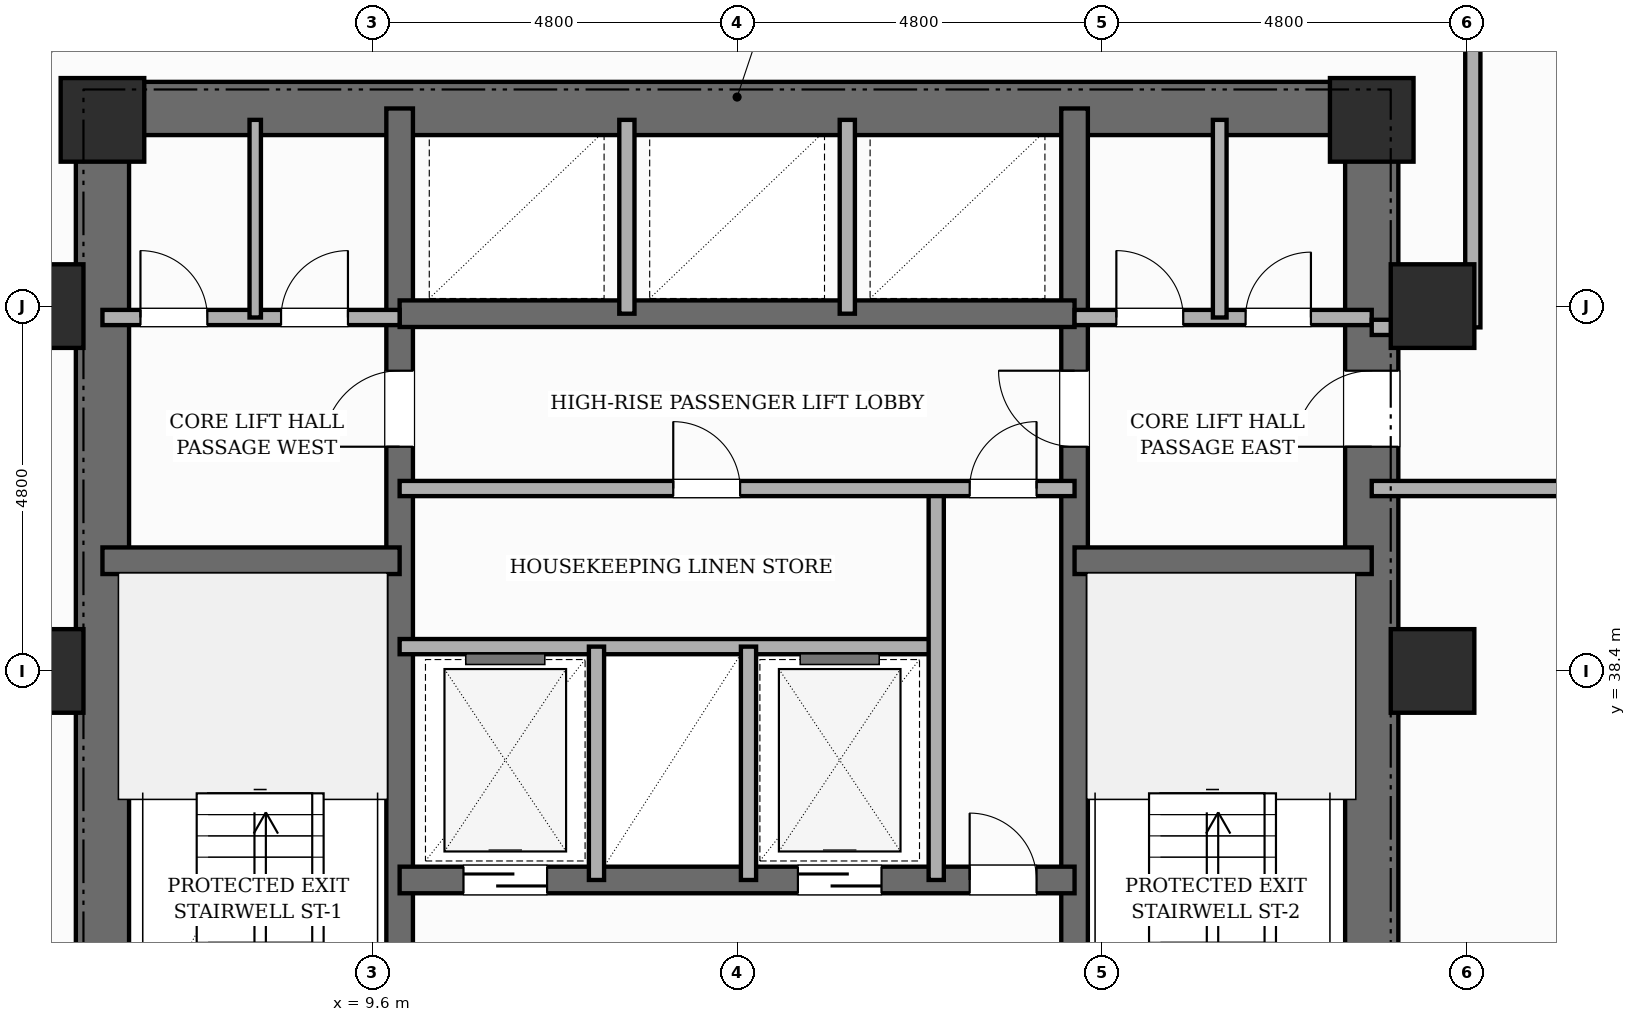
"""IFC4 building model, lengths in metres.
Left out: names, types, materials, properties, quantities, classifications, styles, units other than length and angle.
Written with IfcOpenShell. Run it as: python <this file> out.ifc"""

import sys

from ifc_helpers import new_model, si_unit, direction, frame, frame_2d, origin, origin_2d, place, context, subcontext, project, spatial, rectangle, extrude, element, fill, save


model = new_model("IFC4")
c1 = context("Model", 3, precision=1e-05, world=origin(), true_north=direction((0.0, 1.0)))
c2 = subcontext(c1, "Body", "Model", "MODEL_VIEW")
j1 = project(units=[si_unit("LENGTHUNIT", "METRE"), si_unit("PLANEANGLEUNIT", "RADIAN")], contexts=[c1])
p1 = place(None, origin())
s1 = spatial("IfcSite", under=j1, at=p1, CompositionType="ELEMENT")
p2 = place(p1, origin())
s2 = spatial("IfcBuilding", under=s1, at=p2, CompositionType="ELEMENT")
p3 = place(p2, frame((0.0, 0.0, 101.8)))
s3 = spatial("IfcBuildingStorey", under=s2, at=p3, CompositionType="ELEMENT", Elevation=101.8)
p4 = place(p3, frame((6.05, 30.55, 0.0), z_axis=(0.0, 0.0, 1.0), x_axis=(0.0, 1.0, 0.0)))
e1 = element("IfcWall", 1, at=p4, inside=s3, PredefinedType="SHEAR", context=c2, shape_type="SweptSolid", body=[
    extrude(rectangle(XDim=15.6, YDim=0.7, at=frame_2d((7.8, 0.0))), origin(), (0.0, 0.0, 1.0), 5.4),
])
p5 = place(p3, frame((22.75, 30.55, 0.0), z_axis=(0.0, 0.0, 1.0), x_axis=(0.0, 1.0, 0.0)))
e2 = element("IfcWall", 2, at=p5, inside=s3, PredefinedType="SHEAR", context=c2, shape_type="SweptSolid", body=[
    extrude(rectangle(XDim=15.6, YDim=0.7, at=frame_2d((7.8, 0.0))), origin(), (0.0, 0.0, 1.0), 5.4),
])
p6 = place(p5, frame((10.8, 0.0, 0.0)))
e3 = element("IfcOpeningElement", 3, at=p6, cuts=e2, PredefinedType="OPENING", context=c2, shape_type="SweptSolid", body=[
    extrude(rectangle(XDim=1.0, YDim=2.15, at=frame_2d((0.5, 1.075))), frame((0.0, 0.36, 0.0), z_axis=(0.0, -1.0, 0.0), x_axis=(1.0, 0.0, 0.0)), (0.0, 0.0, 1.0), 0.72),
])
p7 = place(p3, frame((6.05, 45.8, 0.0), z_axis=(0.0, 0.0, 1.0), x_axis=(1.0, 0.0, 0.0)))
e4 = element("IfcWall", 4, at=p7, inside=s3, PredefinedType="SHEAR", context=c2, shape_type="SweptSolid", body=[
    extrude(rectangle(XDim=16.7, YDim=0.7, at=frame_2d((8.35, 0.0))), origin(), (0.0, 0.0, 1.0), 5.4),
])
p8 = place(p3, frame((9.96, 30.9, 0.0), z_axis=(0.0, 0.0, 1.0), x_axis=(0.0, 1.0, 0.0)))
e5 = element("IfcWall", 5, at=p8, inside=s3, PredefinedType="SHEAR", context=c2, shape_type="SweptSolid", body=[
    extrude(rectangle(XDim=14.9, YDim=0.35, at=frame_2d((7.45, 0.0))), origin(), (0.0, 0.0, 1.0), 5.4),
])
p9 = place(p8, frame((0.65, 0.0, 0.0)))
e6 = element("IfcOpeningElement", 6, at=p9, cuts=e5, PredefinedType="OPENING", context=c2, shape_type="SweptSolid", body=[
    extrude(rectangle(XDim=0.95, YDim=2.1, at=frame_2d((0.475, 1.05))), frame((0.0, 0.185, 0.0), z_axis=(0.0, -1.0, 0.0), x_axis=(1.0, 0.0, 0.0)), (0.0, 0.0, 1.0), 0.37),
])
p10 = place(p8, frame((10.45, 0.0, 0.0)))
e7 = element("IfcOpeningElement", 7, at=p10, cuts=e5, PredefinedType="OPENING", context=c2, shape_type="SweptSolid", body=[
    extrude(rectangle(XDim=1.0, YDim=2.15, at=frame_2d((0.5, 1.075))), frame((0.0, 0.185, 0.0), z_axis=(0.0, -1.0, 0.0), x_axis=(1.0, 0.0, 0.0)), (0.0, 0.0, 1.0), 0.37),
])
p11 = place(p3, frame((18.84, 30.9, 0.0), z_axis=(0.0, 0.0, 1.0), x_axis=(0.0, 1.0, 0.0)))
e8 = element("IfcWall", 8, at=p11, inside=s3, PredefinedType="SHEAR", context=c2, shape_type="SweptSolid", body=[
    extrude(rectangle(XDim=14.9, YDim=0.35, at=frame_2d((7.45, 0.0))), origin(), (0.0, 0.0, 1.0), 5.4),
])
p12 = place(p11, frame((0.65, 0.0, 0.0)))
e9 = element("IfcOpeningElement", 9, at=p12, cuts=e8, PredefinedType="OPENING", context=c2, shape_type="SweptSolid", body=[
    extrude(rectangle(XDim=0.95, YDim=2.1, at=frame_2d((0.475, 1.05))), frame((0.0, 0.185, 0.0), z_axis=(0.0, -1.0, 0.0), x_axis=(1.0, 0.0, 0.0)), (0.0, 0.0, 1.0), 0.37),
])
p13 = place(p11, frame((10.45, 0.0, 0.0)))
e10 = element("IfcOpeningElement", 10, at=p13, cuts=e8, PredefinedType="OPENING", context=c2, shape_type="SweptSolid", body=[
    extrude(rectangle(XDim=1.0, YDim=2.15, at=frame_2d((0.5, 1.075))), frame((0.0, 0.185, 0.0), z_axis=(0.0, -1.0, 0.0), x_axis=(1.0, 0.0, 0.0)), (0.0, 0.0, 1.0), 0.37),
])
for number, where, z_axis, x_axis in (
    (11, (6.05, 39.85, 0.0), (0.0, 0.0, 1.0), (1.0, 0.0, 0.0)),
    (12, (18.84, 39.85, 0.0), (0.0, 0.0, 1.0), (1.0, 0.0, 0.0)),
):
    element("IfcWall", number, at=place(p3, frame(where, z_axis=z_axis, x_axis=x_axis)), inside=s3, PredefinedType="SHEAR", context=c2, shape_type="SweptSolid", body=[
        extrude(rectangle(XDim=3.91, YDim=0.35, at=frame_2d((1.955, 0.0))), origin(), (0.0, 0.0, 1.0), 5.4),
    ])
p14 = place(p3, frame((9.96, 35.65, 0.0), z_axis=(0.0, 0.0, 1.0), x_axis=(1.0, 0.0, 0.0)))
e13 = element("IfcWall", 13, at=p14, inside=s3, PredefinedType="SHEAR", context=c2, shape_type="SweptSolid", body=[
    extrude(rectangle(XDim=8.88, YDim=0.35, at=frame_2d((4.44, 0.0))), origin(), (0.0, 0.0, 1.0), 5.4),
])
p15 = place(p14, frame((0.84, 0.0, 0.0)))
e14 = element("IfcOpeningElement", 14, at=p15, cuts=e13, PredefinedType="OPENING", context=c2, shape_type="SweptSolid", body=[
    extrude(rectangle(XDim=1.1, YDim=2.15, at=frame_2d((0.55, 1.075))), frame((0.0, 0.185, 0.0), z_axis=(0.0, -1.0, 0.0), x_axis=(1.0, 0.0, 0.0)), (0.0, 0.0, 1.0), 0.37),
])
p16 = place(p14, frame((5.24, 0.0, 0.0)))
e15 = element("IfcOpeningElement", 15, at=p16, cuts=e13, PredefinedType="OPENING", context=c2, shape_type="SweptSolid", body=[
    extrude(rectangle(XDim=1.1, YDim=2.15, at=frame_2d((0.55, 1.075))), frame((0.0, 0.185, 0.0), z_axis=(0.0, -1.0, 0.0), x_axis=(1.0, 0.0, 0.0)), (0.0, 0.0, 1.0), 0.37),
])
p17 = place(p14, frame((7.5, 0.0, 0.0)))
e16 = element("IfcOpeningElement", 16, at=p17, cuts=e13, PredefinedType="OPENING", context=c2, shape_type="SweptSolid", body=[
    extrude(rectangle(XDim=0.88, YDim=2.1, at=frame_2d((0.44, 1.05))), frame((0.0, 0.185, 0.0), z_axis=(0.0, -1.0, 0.0), x_axis=(1.0, 0.0, 0.0)), (0.0, 0.0, 1.0), 0.37),
])
p18 = place(p3, frame((9.96, 43.1, 0.0), z_axis=(0.0, 0.0, 1.0), x_axis=(1.0, 0.0, 0.0)))
e17 = element("IfcWall", 17, at=p18, inside=s3, PredefinedType="SHEAR", context=c2, shape_type="SweptSolid", body=[
    extrude(rectangle(XDim=8.88, YDim=0.35, at=frame_2d((4.44, 0.0))), origin(), (0.0, 0.0, 1.0), 5.4),
])
for number, where, z_axis, x_axis in (
    (18, (5.25, 38.4, 0.0), (0.0, 0.0, 1.0), (1.0, 0.0, 0.0)),
    (19, (5.25, 43.2, 0.0), (0.0, 0.0, 1.0), (1.0, 0.0, 0.0)),
    (20, (6.05, 45.65, 0.0), (0.0, 0.0, 1.0), (1.0, 0.0, 0.0)),
    (21, (22.75, 45.65, 0.0), (0.0, 0.0, 1.0), (1.0, 0.0, 0.0)),
    (22, (23.55, 38.4, 0.0), (0.0, 0.0, 1.0), (1.0, 0.0, 0.0)),
    (23, (23.55, 43.2, 0.0), (0.0, 0.0, 1.0), (1.0, 0.0, 0.0)),
):
    element("IfcColumn", number, at=place(p3, frame(where, z_axis=z_axis, x_axis=x_axis)), inside=s3, PredefinedType="COLUMN", context=c2, shape_type="SweptSolid", body=[
        extrude(rectangle(XDim=1.1, YDim=1.1, at=origin_2d()), origin(), (0.0, 0.0, 1.0), 5.4),
    ])
p19 = place(p3, frame((5.03, 46.16, 0.0), z_axis=(0.0, 0.0, 1.0), x_axis=(0.382650053678, 0.92389335771, 0.0)))
e24 = element("IfcWall", 24, at=p19, inside=s3, PredefinedType="STANDARD", context=c2, shape_type="SweptSolid", body=[
    extrude(rectangle(XDim=0.626, YDim=0.32, at=frame_2d((0.313, 0.0))), origin(), (0.0, 0.0, 1.0), 5.16),
])
p20 = place(p3, frame((9.96, 38.72, 0.0), z_axis=(0.0, 0.0, 1.0), x_axis=(1.0, 0.0, 0.0)))
e25 = element("IfcWall", 25, at=p20, inside=s3, PredefinedType="POLYGONAL", context=c2, shape_type="SweptSolid", body=[
    extrude(rectangle(XDim=7.06, YDim=0.2, at=frame_2d((3.53, 0.0))), origin(), (0.0, 0.0, 1.0), 5.16),
])
for number, where, z_axis, x_axis in (
    (26, (12.55, 35.65, 0.0), (0.0, 0.0, 1.0), (0.0, 1.0, 0.0)),
    (27, (14.55, 35.65, 0.0), (0.0, 0.0, 1.0), (0.0, 1.0, 0.0)),
):
    element("IfcWall", number, at=place(p3, frame(where, z_axis=z_axis, x_axis=x_axis)), inside=s3, PredefinedType="POLYGONAL", context=c2, shape_type="SweptSolid", body=[
        extrude(rectangle(XDim=3.07, YDim=0.2, at=frame_2d((1.535, 0.0))), origin(), (0.0, 0.0, 1.0), 5.16),
    ])
p21 = place(p3, frame((17.02, 35.65, 0.0), z_axis=(0.0, 0.0, 1.0), x_axis=(0.0, 1.0, 0.0)))
e28 = element("IfcWall", 28, at=p21, inside=s3, PredefinedType="POLYGONAL", context=c2, shape_type="SweptSolid", body=[
    extrude(rectangle(XDim=5.15, YDim=0.2, at=frame_2d((2.575, 0.0))), origin(), (0.0, 0.0, 1.0), 5.16),
])
p22 = place(p3, frame((9.96, 40.8, 0.0), z_axis=(0.0, 0.0, 1.0), x_axis=(1.0, 0.0, 0.0)))
e29 = element("IfcWall", 29, at=p22, inside=s3, PredefinedType="POLYGONAL", context=c2, shape_type="SweptSolid", body=[
    extrude(rectangle(XDim=8.88, YDim=0.2, at=frame_2d((4.44, 0.0))), origin(), (0.0, 0.0, 1.0), 5.16),
])
p23 = place(p22, frame((7.5, 0.0, 0.0)))
e30 = element("IfcOpeningElement", 30, at=p23, cuts=e29, PredefinedType="OPENING", context=c2, shape_type="SweptSolid", body=[
    extrude(rectangle(XDim=0.88, YDim=2.1, at=frame_2d((0.44, 1.05))), frame((0.0, 0.11, 0.0), z_axis=(0.0, -1.0, 0.0), x_axis=(1.0, 0.0, 0.0)), (0.0, 0.0, 1.0), 0.22),
])
p24 = place(p22, frame((3.6, 0.0, 0.0)))
e31 = element("IfcOpeningElement", 31, at=p24, cuts=e29, PredefinedType="OPENING", context=c2, shape_type="SweptSolid", body=[
    extrude(rectangle(XDim=0.88, YDim=2.1, at=frame_2d((0.44, 1.05))), frame((0.0, 0.11, 0.0), z_axis=(0.0, -1.0, 0.0), x_axis=(1.0, 0.0, 0.0)), (0.0, 0.0, 1.0), 0.22),
])
p25 = place(p3, frame((18.84, 43.05, 0.0), z_axis=(0.0, 0.0, 1.0), x_axis=(1.0, 0.0, 0.0)))
e32 = element("IfcWall", 32, at=p25, inside=s3, PredefinedType="POLYGONAL", context=c2, shape_type="SweptSolid", body=[
    extrude(rectangle(XDim=3.91, YDim=0.2, at=frame_2d((1.955, 0.0))), origin(), (0.0, 0.0, 1.0), 4.34),
])
p26 = place(p25, frame((0.55, 0.0, 0.0)))
e33 = element("IfcOpeningElement", 33, at=p26, cuts=e32, PredefinedType="OPENING", context=c2, shape_type="SweptSolid", body=[
    extrude(rectangle(XDim=0.88, YDim=2.1, at=frame_2d((0.44, 1.05))), frame((0.0, 0.11, 0.0), z_axis=(0.0, -1.0, 0.0), x_axis=(1.0, 0.0, 0.0)), (0.0, 0.0, 1.0), 0.22),
])
p27 = place(p25, frame((2.25, 0.0, 0.0)))
e34 = element("IfcOpeningElement", 34, at=p27, cuts=e32, PredefinedType="OPENING", context=c2, shape_type="SweptSolid", body=[
    extrude(rectangle(XDim=0.86, YDim=2.1, at=frame_2d((0.43, 1.05))), frame((0.0, 0.11, 0.0), z_axis=(0.0, -1.0, 0.0), x_axis=(1.0, 0.0, 0.0)), (0.0, 0.0, 1.0), 0.22),
])
p28 = place(p3, frame((6.05, 43.05, 0.0), z_axis=(0.0, 0.0, 1.0), x_axis=(1.0, 0.0, 0.0)))
e35 = element("IfcWall", 35, at=p28, inside=s3, PredefinedType="POLYGONAL", context=c2, shape_type="SweptSolid", body=[
    extrude(rectangle(XDim=3.91, YDim=0.2, at=frame_2d((1.955, 0.0))), origin(), (0.0, 0.0, 1.0), 4.34),
])
p29 = place(p28, frame((0.5, 0.0, 0.0)))
e36 = element("IfcOpeningElement", 36, at=p29, cuts=e35, PredefinedType="OPENING", context=c2, shape_type="SweptSolid", body=[
    extrude(rectangle(XDim=0.88, YDim=2.1, at=frame_2d((0.44, 1.05))), frame((0.0, 0.11, 0.0), z_axis=(0.0, -1.0, 0.0), x_axis=(1.0, 0.0, 0.0)), (0.0, 0.0, 1.0), 0.22),
])
p30 = place(p28, frame((2.35, 0.0, 0.0)))
e37 = element("IfcOpeningElement", 37, at=p30, cuts=e35, PredefinedType="OPENING", context=c2, shape_type="SweptSolid", body=[
    extrude(rectangle(XDim=0.88, YDim=2.1, at=frame_2d((0.44, 1.05))), frame((0.0, 0.11, 0.0), z_axis=(0.0, -1.0, 0.0), x_axis=(1.0, 0.0, 0.0)), (0.0, 0.0, 1.0), 0.22),
])
for number, where, z_axis, x_axis in (
    (38, (12.95, 43.1, 0.0), (0.0, 0.0, 1.0), (0.0, 1.0, 0.0)),
    (39, (15.85, 43.1, 0.0), (0.0, 0.0, 1.0), (0.0, 1.0, 0.0)),
):
    element("IfcWall", number, at=place(p3, frame(where, z_axis=z_axis, x_axis=x_axis)), inside=s3, PredefinedType="POLYGONAL", context=c2, shape_type="SweptSolid", body=[
        extrude(rectangle(XDim=2.55, YDim=0.2, at=frame_2d((1.275, 0.0))), origin(), (0.0, 0.0, 1.0), 5.16),
    ])
p31 = place(p3, frame((8.06, 43.05, 0.0), z_axis=(0.0, 0.0, 1.0), x_axis=(0.0, 1.0, 0.0)))
e40 = element("IfcWall", 40, at=p31, inside=s3, PredefinedType="PARTITIONING", context=c2, shape_type="SweptSolid", body=[
    extrude(rectangle(XDim=2.6, YDim=0.15, at=frame_2d((1.3, 0.0))), origin(), (0.0, 0.0, 1.0), 5.16),
])
p32 = place(p3, frame((20.75, 43.05, 0.0), z_axis=(0.0, 0.0, 1.0), x_axis=(0.0, 1.0, 0.0)))
e41 = element("IfcWall", 41, at=p32, inside=s3, PredefinedType="PLUMBINGWALL", context=c2, shape_type="SweptSolid", body=[
    extrude(rectangle(XDim=2.6, YDim=0.18, at=frame_2d((1.3, 0.0))), origin(), (0.0, 0.0, 1.0), 5.16),
])
p33 = place(p3, frame((22.75, 40.8, 0.0), z_axis=(0.0, 0.0, 1.0), x_axis=(1.0, 0.0, 0.0)))
e42 = element("IfcWall", 42, at=p33, inside=s3, PredefinedType="PARTITIONING", context=c2, shape_type="SweptSolid", body=[
    extrude(rectangle(XDim=2.85, YDim=0.2, at=frame_2d((1.425, 0.0))), origin(), (0.0, 0.0, 1.0), 5.16),
])
p34 = place(p3, frame((22.75, 42.92, 0.0), z_axis=(0.0, 0.0, 1.0), x_axis=(1.0, 0.0, 0.0)))
e43 = element("IfcWall", 43, at=p34, inside=s3, PredefinedType="PARTITIONING", context=c2, shape_type="SweptSolid", body=[
    extrude(rectangle(XDim=1.33, YDim=0.2, at=frame_2d((0.665, 0.0))), origin(), (0.0, 0.0, 1.0), 4.34),
])
p35 = place(p3, frame((24.08, 42.92, 0.0), z_axis=(0.0, 0.0, 1.0), x_axis=(0.0, 1.0, 0.0)))
e44 = element("IfcWall", 44, at=p35, inside=s3, PredefinedType="PARTITIONING", context=c2, shape_type="SweptSolid", body=[
    extrude(rectangle(XDim=3.92, YDim=0.2, at=frame_2d((1.96, 0.0))), origin(), (0.0, 0.0, 1.0), 5.16),
])
p36 = place(p15, origin())
e45 = element("IfcDoor", 45, at=p36, inside=s3, OperationType="SLIDING_TO_LEFT", PredefinedType="DOOR", context=c2, shape_type="SweptSolid", body=[
    extrude(rectangle(XDim=1.1, YDim=2.15, at=frame_2d((0.55, 1.075))), frame((0.0, 0.025, 0.0), z_axis=(0.0, -1.0, 0.0), x_axis=(1.0, 0.0, 0.0)), (0.0, 0.0, 1.0), 0.05),
])
fill(e14, e45)
p37 = place(p16, origin())
e46 = element("IfcDoor", 46, at=p37, inside=s3, OperationType="SLIDING_TO_RIGHT", PredefinedType="DOOR", context=c2, shape_type="SweptSolid", body=[
    extrude(rectangle(XDim=1.1, YDim=2.15, at=frame_2d((0.55, 1.075))), frame((0.0, 0.025, 0.0), z_axis=(0.0, -1.0, 0.0), x_axis=(1.0, 0.0, 0.0)), (0.0, 0.0, 1.0), 0.05),
])
fill(e15, e46)
p38 = place(p17, origin())
e47 = element("IfcDoor", 47, at=p38, inside=s3, OperationType="SINGLE_SWING_LEFT", PredefinedType="DOOR", context=c2, shape_type="SweptSolid", body=[
    extrude(rectangle(XDim=0.88, YDim=2.1, at=frame_2d((0.44, 1.05))), frame((0.0, 0.025, 0.0), z_axis=(0.0, -1.0, 0.0), x_axis=(1.0, 0.0, 0.0)), (0.0, 0.0, 1.0), 0.05),
])
fill(e16, e47)
p39 = place(p23, origin())
e48 = element("IfcDoor", 48, at=p39, inside=s3, OperationType="SINGLE_SWING_RIGHT", PredefinedType="DOOR", context=c2, shape_type="SweptSolid", body=[
    extrude(rectangle(XDim=0.88, YDim=2.1, at=frame_2d((0.44, 1.05))), frame((0.0, 0.025, 0.0), z_axis=(0.0, -1.0, 0.0), x_axis=(1.0, 0.0, 0.0)), (0.0, 0.0, 1.0), 0.05),
])
fill(e30, e48)
p40 = place(p10, origin())
e49 = element("IfcDoor", 49, at=p40, inside=s3, OperationType="SINGLE_SWING_LEFT", PredefinedType="DOOR", context=c2, shape_type="SweptSolid", body=[
    extrude(rectangle(XDim=1.0, YDim=2.15, at=frame_2d((0.5, 1.075))), frame((0.0, 0.025, 0.0), z_axis=(0.0, -1.0, 0.0), x_axis=(1.0, 0.0, 0.0)), (0.0, 0.0, 1.0), 0.05),
])
fill(e7, e49)
p41 = place(p13, origin())
e50 = element("IfcDoor", 50, at=p41, inside=s3, OperationType="SINGLE_SWING_RIGHT", PredefinedType="DOOR", context=c2, shape_type="SweptSolid", body=[
    extrude(rectangle(XDim=1.0, YDim=2.15, at=frame_2d((0.5, 1.075))), frame((0.0, 0.025, 0.0), z_axis=(0.0, -1.0, 0.0), x_axis=(1.0, 0.0, 0.0)), (0.0, 0.0, 1.0), 0.05),
])
fill(e10, e50)
p42 = place(p6, origin())
e51 = element("IfcDoor", 51, at=p42, inside=s3, OperationType="SINGLE_SWING_LEFT", PredefinedType="DOOR", context=c2, shape_type="SweptSolid", body=[
    extrude(rectangle(XDim=1.0, YDim=2.15, at=frame_2d((0.5, 1.075))), frame((0.0, 0.025, 0.0), z_axis=(0.0, -1.0, 0.0), x_axis=(1.0, 0.0, 0.0)), (0.0, 0.0, 1.0), 0.05),
])
fill(e3, e51)
p43 = place(p29, origin())
e52 = element("IfcDoor", 52, at=p43, inside=s3, OperationType="SINGLE_SWING_LEFT", PredefinedType="DOOR", context=c2, shape_type="SweptSolid", body=[
    extrude(rectangle(XDim=0.88, YDim=2.1, at=frame_2d((0.44, 1.05))), frame((0.0, 0.025, 0.0), z_axis=(0.0, -1.0, 0.0), x_axis=(1.0, 0.0, 0.0)), (0.0, 0.0, 1.0), 0.05),
])
fill(e36, e52)
p44 = place(p30, origin())
e53 = element("IfcDoor", 53, at=p44, inside=s3, OperationType="SINGLE_SWING_RIGHT", PredefinedType="DOOR", context=c2, shape_type="SweptSolid", body=[
    extrude(rectangle(XDim=0.88, YDim=2.1, at=frame_2d((0.44, 1.05))), frame((0.0, 0.025, 0.0), z_axis=(0.0, -1.0, 0.0), x_axis=(1.0, 0.0, 0.0)), (0.0, 0.0, 1.0), 0.05),
])
fill(e37, e53)
p45 = place(p24, origin())
e54 = element("IfcDoor", 54, at=p45, inside=s3, OperationType="SINGLE_SWING_LEFT", PredefinedType="DOOR", context=c2, shape_type="SweptSolid", body=[
    extrude(rectangle(XDim=0.88, YDim=2.1, at=frame_2d((0.44, 1.05))), frame((0.0, 0.025, 0.0), z_axis=(0.0, -1.0, 0.0), x_axis=(1.0, 0.0, 0.0)), (0.0, 0.0, 1.0), 0.05),
])
fill(e31, e54)
p46 = place(p26, origin())
e55 = element("IfcDoor", 55, at=p46, inside=s3, OperationType="SINGLE_SWING_LEFT", PredefinedType="DOOR", context=c2, shape_type="SweptSolid", body=[
    extrude(rectangle(XDim=0.88, YDim=2.1, at=frame_2d((0.44, 1.05))), frame((0.0, 0.025, 0.0), z_axis=(0.0, -1.0, 0.0), x_axis=(1.0, 0.0, 0.0)), (0.0, 0.0, 1.0), 0.05),
])
fill(e33, e55)
p47 = place(p27, origin())
e56 = element("IfcDoor", 56, at=p47, inside=s3, OperationType="SINGLE_SWING_RIGHT", PredefinedType="DOOR", context=c2, shape_type="SweptSolid", body=[
    extrude(rectangle(XDim=0.86, YDim=2.1, at=frame_2d((0.43, 1.05))), frame((0.0, 0.025, 0.0), z_axis=(0.0, -1.0, 0.0), x_axis=(1.0, 0.0, 0.0)), (0.0, 0.0, 1.0), 0.05),
])
fill(e34, e56)
save(model, sys.argv[1])
